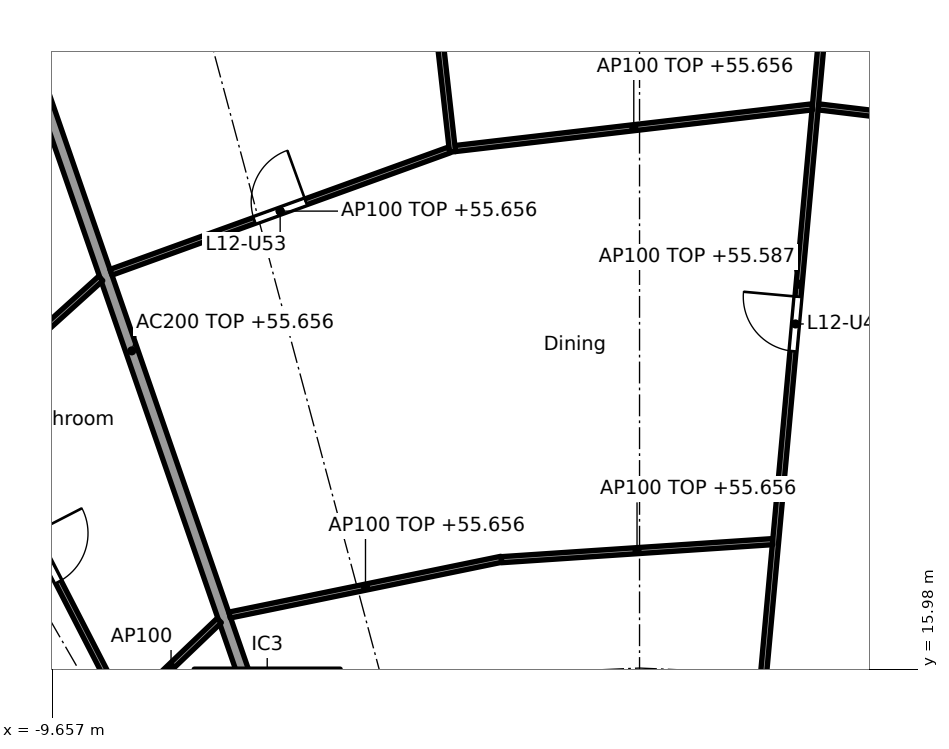
"""IFC4 building model, lengths in metres.
Left out: names, types, materials, properties, quantities, classifications, styles, units other than length and angle.
Written with IfcOpenShell. Run it as: python <this file> out.ifc"""

import sys

from ifc_helpers import new_model, si_unit, direction, frame, frame_2d, origin, origin_2d, place, context, subcontext, project, spatial, rectangle, extrude, element, fill, save


model = new_model("IFC4")
c1 = context("Model", 3, precision=1e-05, world=origin(), true_north=direction((0.0, 1.0)))
c2 = subcontext(c1, "Body", "Model", "MODEL_VIEW")
j1 = project(units=[si_unit("LENGTHUNIT", "METRE"), si_unit("PLANEANGLEUNIT", "RADIAN")], contexts=[c1])
p1 = place(None, origin())
s1 = spatial("IfcSite", under=j1, at=p1, CompositionType="ELEMENT")
p2 = place(p1, origin())
s2 = spatial("IfcBuilding", under=s1, at=p2, CompositionType="ELEMENT")
p3 = place(p2, frame((0.0, 0.0, 52.9)))
s3 = spatial("IfcBuildingStorey", under=s2, at=p3, CompositionType="ELEMENT", Elevation=52.9)
p4 = place(p3, frame((-6.123, 14.782, 0.0), z_axis=(0.0, 0.0, 1.0), x_axis=(1.0, 0.0, 0.0)))
e1 = element("IfcColumn", 1, at=p4, inside=s3, PredefinedType="COLUMN", context=c2, shape_type="SweptSolid", body=[
    extrude(rectangle(XDim=2.4, YDim=2.4, at=origin_2d()), origin(), (0.0, 0.0, 1.0), 3.7),
])
p5 = place(p3, frame((-6.139, 14.829, 0.0), z_axis=(0.0, 0.0, 1.0), x_axis=(-0.327178799566, 0.944962450637, 0.0)))
e2 = element("IfcWall", 2, at=p5, inside=s3, PredefinedType="PARTITIONING", context=c2, shape_type="SweptSolid", body=[
    extrude(rectangle(XDim=13.517, YDim=0.2, at=frame_2d((6.759, 0.0))), origin(), (0.0, 0.0, 1.0), 2.756),
])
p6 = place(p3, frame((8.907, 24.51, 0.0), z_axis=(0.0, 0.0, 1.0), x_axis=(-0.992836798252, 0.119478416615, 0.0)))
e3 = element("IfcWall", 3, at=p6, inside=s3, PredefinedType="PARTITIONING", context=c2, shape_type="SweptSolid", body=[
    extrude(rectangle(XDim=6.01, YDim=0.1, at=frame_2d((3.005, 0.0))), origin(), (0.0, 0.0, 1.0), 2.756),
])
p7 = place(p6, frame((2.555, 0.0, 0.0)))
e4 = element("IfcOpeningElement", 4, at=p7, cuts=e3, PredefinedType="OPENING", context=c2, shape_type="SweptSolid", body=[
    extrude(rectangle(XDim=0.9, YDim=2.1, at=frame_2d((0.45, 1.05))), frame((0.0, 0.06, 0.0), z_axis=(0.0, -1.0, 0.0), x_axis=(1.0, 0.0, 0.0)), (0.0, 0.0, 1.0), 0.12),
])
p8 = place(p3, frame((1.744, 12.664, 0.0), z_axis=(0.0, 0.0, 1.0), x_axis=(0.090893639596, 0.995860605849, 0.0)))
e5 = element("IfcWall", 5, at=p8, inside=s3, PredefinedType="PARTITIONING", context=c2, shape_type="SweptSolid", body=[
    extrude(rectangle(XDim=19.374, YDim=0.1, at=frame_2d((9.687, 0.0))), origin(), (0.0, 0.0, 1.0), 2.687),
])
p9 = place(p8, frame((2.27, 0.0, 0.0)))
e6 = element("IfcOpeningElement", 6, at=p9, cuts=e5, PredefinedType="OPENING", context=c2, shape_type="SweptSolid", body=[
    extrude(rectangle(XDim=0.9, YDim=2.1, at=frame_2d((0.45, 1.05))), frame((0.0, 0.06, 0.0), z_axis=(0.0, -1.0, 0.0), x_axis=(1.0, 0.0, 0.0)), (0.0, 0.0, 1.0), 0.12),
])
p10 = place(p8, frame((8.582, 0.0, 0.0)))
e7 = element("IfcOpeningElement", 7, at=p10, cuts=e5, PredefinedType="OPENING", context=c2, shape_type="SweptSolid", body=[
    extrude(rectangle(XDim=0.9, YDim=2.1, at=frame_2d((0.45, 1.05))), frame((0.0, 0.06, 0.0), z_axis=(0.0, -1.0, 0.0), x_axis=(1.0, 0.0, 0.0)), (0.0, 0.0, 1.0), 0.12),
])
p11 = place(p8, frame((15.548, 0.0, 0.0)))
e8 = element("IfcOpeningElement", 8, at=p11, cuts=e5, PredefinedType="OPENING", context=c2, shape_type="SweptSolid", body=[
    extrude(rectangle(XDim=0.9, YDim=2.1, at=frame_2d((0.45, 1.05))), frame((0.0, 0.06, 0.0), z_axis=(0.0, -1.0, 0.0), x_axis=(1.0, 0.0, 0.0)), (0.0, 0.0, 1.0), 0.12),
])
p12 = place(p3, frame((2.188, 18.079, 0.0), z_axis=(0.0, 0.0, 1.0), x_axis=(-0.997791437766, -0.066424744789, 0.0)))
e9 = element("IfcWall", 9, at=p12, inside=s3, PredefinedType="PARTITIONING", context=c2, shape_type="SweptSolid", body=[
    extrude(rectangle(XDim=4.469, YDim=0.1, at=frame_2d((2.235, 0.0))), origin(), (0.0, 0.0, 1.0), 2.756),
])
p13 = place(p3, frame((2.842, 25.229, 0.0), z_axis=(0.0, 0.0, 1.0), x_axis=(-0.993255612046, -0.115945198862, 0.0)))
e10 = element("IfcWall", 10, at=p13, inside=s3, PredefinedType="PARTITIONING", context=c2, shape_type="SweptSolid", body=[
    extrude(rectangle(XDim=5.913, YDim=0.1, at=frame_2d((2.956, 0.0))), origin(), (0.0, 0.0, 1.0), 2.756),
])
p14 = place(p3, frame((-2.272, 17.789, 0.0), z_axis=(0.0, 0.0, 1.0), x_axis=(-0.979595137747, -0.200981009307, 0.0)))
e11 = element("IfcWall", 11, at=p14, inside=s3, PredefinedType="PARTITIONING", context=c2, shape_type="SweptSolid", body=[
    extrude(rectangle(XDim=4.562, YDim=0.1, at=frame_2d((2.281, 0.0))), origin(), (0.0, 0.0, 1.0), 2.756),
])
p15 = place(p3, frame((-3.075, 24.488, 0.0), z_axis=(0.0, 0.0, 1.0), x_axis=(-0.111705235978, 0.993741384997, 0.0)))
e12 = element("IfcWall", 12, at=p15, inside=s3, PredefinedType="PARTITIONING", context=c2, shape_type="SweptSolid", body=[
    extrude(rectangle(XDim=6.395, YDim=0.1, at=frame_2d((3.198, 0.0))), origin(), (0.0, 0.0, 1.0), 2.756),
])
p16 = place(p3, frame((-3.128, 24.521, 0.0), z_axis=(0.0, 0.0, 1.0), x_axis=(-0.940401494588, -0.340066212636, 0.0)))
e13 = element("IfcWall", 13, at=p16, inside=s3, PredefinedType="PARTITIONING", context=c2, shape_type="SweptSolid", body=[
    extrude(rectangle(XDim=5.917, YDim=0.1, at=frame_2d((2.958, 0.0))), origin(), (0.0, 0.0, 1.0), 2.756),
])
p17 = place(p16, frame((2.509, 0.0, 0.0)))
e14 = element("IfcOpeningElement", 14, at=p17, cuts=e13, PredefinedType="OPENING", context=c2, shape_type="SweptSolid", body=[
    extrude(rectangle(XDim=0.9, YDim=2.1, at=frame_2d((0.45, 1.05))), frame((0.0, 0.06, 0.0), z_axis=(0.0, -1.0, 0.0), x_axis=(1.0, 0.0, 0.0)), (0.0, 0.0, 1.0), 0.12),
])
p18 = place(p3, frame((-6.912, 16.782, 0.0), z_axis=(0.0, 0.0, 1.0), x_axis=(-0.722789289931, -0.691068478778, 0.0)))
e15 = element("IfcWall", 15, at=p18, inside=s3, PredefinedType="PARTITIONING", context=c2, shape_type="SweptSolid", body=[
    extrude(rectangle(XDim=2.194, YDim=0.1, at=frame_2d((1.097, 0.0))), origin(), (0.0, 0.0, 1.0), 3.44),
])
p19 = place(p3, frame((-8.861, 22.407, 0.0), z_axis=(0.0, 0.0, 1.0), x_axis=(-0.741713303551, -0.670717060567, 0.0)))
e16 = element("IfcWall", 16, at=p19, inside=s3, PredefinedType="PARTITIONING", context=c2, shape_type="SweptSolid", body=[
    extrude(rectangle(XDim=6.059, YDim=0.1, at=frame_2d((3.03, 0.0))), origin(), (0.0, 0.0, 1.0), 2.756),
])
p20 = place(p3, frame((-6.477, 11.427, 0.0), z_axis=(0.0, 0.0, 1.0), x_axis=(-0.457464037982, 0.889228122561, 0.0)))
e17 = element("IfcWall", 17, at=p20, inside=s3, PredefinedType="PARTITIONING", context=c2, shape_type="SweptSolid", body=[
    extrude(rectangle(XDim=10.032, YDim=0.1, at=frame_2d((5.016, 0.0))), origin(), (0.0, 0.0, 1.0), 2.687),
])
p21 = place(p20, frame((0.35, 0.0, 0.0)))
e18 = element("IfcOpeningElement", 18, at=p21, cuts=e17, PredefinedType="OPENING", context=c2, shape_type="SweptSolid", body=[
    extrude(rectangle(XDim=0.9, YDim=2.1, at=frame_2d((0.45, 1.05))), frame((0.0, 0.06, 0.0), z_axis=(0.0, -1.0, 0.0), x_axis=(1.0, 0.0, 0.0)), (0.0, 0.0, 1.0), 0.12),
])
p22 = place(p20, frame((6.735, 0.0, 0.0)))
e19 = element("IfcOpeningElement", 19, at=p22, cuts=e17, PredefinedType="OPENING", context=c2, shape_type="SweptSolid", body=[
    extrude(rectangle(XDim=0.9, YDim=2.1, at=frame_2d((0.45, 1.05))), frame((0.0, 0.06, 0.0), z_axis=(0.0, -1.0, 0.0), x_axis=(1.0, 0.0, 0.0)), (0.0, 0.0, 1.0), 0.12),
])
p23 = place(p3, frame((-8.953, 8.958, 0.0), z_axis=(0.0, 0.0, 1.0), x_axis=(-0.684574307023, 0.728943082939, 0.0)))
e20 = element("IfcWall", 20, at=p23, inside=s3, PredefinedType="PARTITIONING", context=c2, shape_type="SweptSolid", body=[
    extrude(rectangle(XDim=15.231, YDim=0.1, at=frame_2d((7.615, 0.0))), origin(), (0.0, 0.0, 1.0), 2.687),
])
p24 = place(p23, frame((1.54, 0.0, 0.0)))
e21 = element("IfcOpeningElement", 21, at=p24, cuts=e20, PredefinedType="OPENING", context=c2, shape_type="SweptSolid", body=[
    extrude(rectangle(XDim=0.9, YDim=2.1, at=frame_2d((0.45, 1.05))), frame((0.0, 0.06, 0.0), z_axis=(0.0, -1.0, 0.0), x_axis=(1.0, 0.0, 0.0)), (0.0, 0.0, 1.0), 0.12),
])
p25 = place(p23, frame((6.174, 0.0, 0.0)))
e22 = element("IfcOpeningElement", 22, at=p25, cuts=e20, PredefinedType="OPENING", context=c2, shape_type="SweptSolid", body=[
    extrude(rectangle(XDim=0.9, YDim=2.1, at=frame_2d((0.45, 1.05))), frame((0.0, 0.06, 0.0), z_axis=(0.0, -1.0, 0.0), x_axis=(1.0, 0.0, 0.0)), (0.0, 0.0, 1.0), 0.12),
])
p26 = place(p23, frame((11.8, 0.0, 0.0)))
e23 = element("IfcOpeningElement", 23, at=p26, cuts=e20, PredefinedType="OPENING", context=c2, shape_type="SweptSolid", body=[
    extrude(rectangle(XDim=0.9, YDim=2.1, at=frame_2d((0.45, 1.05))), frame((0.0, 0.06, 0.0), z_axis=(0.0, -1.0, 0.0), x_axis=(1.0, 0.0, 0.0)), (0.0, 0.0, 1.0), 0.12),
])
p27 = place(p22, frame((0.9, 0.0, 0.0), x_axis=(-1.0, 0.0, 0.0)))
e24 = element("IfcDoor", 24, at=p27, inside=s3, OperationType="SINGLE_SWING_LEFT", PredefinedType="DOOR", context=c2, shape_type="SweptSolid", body=[
    extrude(rectangle(XDim=0.9, YDim=2.1, at=frame_2d((0.45, 1.05))), frame((0.0, 0.025, 0.0), z_axis=(0.0, -1.0, 0.0), x_axis=(1.0, 0.0, 0.0)), (0.0, 0.0, 1.0), 0.05),
])
fill(e19, e24)
p28 = place(p10, origin())
e25 = element("IfcDoor", 25, at=p28, inside=s3, OperationType="SINGLE_SWING_RIGHT", PredefinedType="DOOR", context=c2, shape_type="SweptSolid", body=[
    extrude(rectangle(XDim=0.9, YDim=2.1, at=frame_2d((0.45, 1.05))), frame((0.0, 0.025, 0.0), z_axis=(0.0, -1.0, 0.0), x_axis=(1.0, 0.0, 0.0)), (0.0, 0.0, 1.0), 0.05),
])
fill(e7, e25)
p29 = place(p17, frame((0.9, 0.0, 0.0), x_axis=(-1.0, 0.0, 0.0)))
e26 = element("IfcDoor", 26, at=p29, inside=s3, OperationType="SINGLE_SWING_RIGHT", PredefinedType="DOOR", context=c2, shape_type="SweptSolid", body=[
    extrude(rectangle(XDim=0.9, YDim=2.1, at=frame_2d((0.45, 1.05))), frame((0.0, 0.025, 0.0), z_axis=(0.0, -1.0, 0.0), x_axis=(1.0, 0.0, 0.0)), (0.0, 0.0, 1.0), 0.05),
])
fill(e14, e26)
save(model, sys.argv[1])
